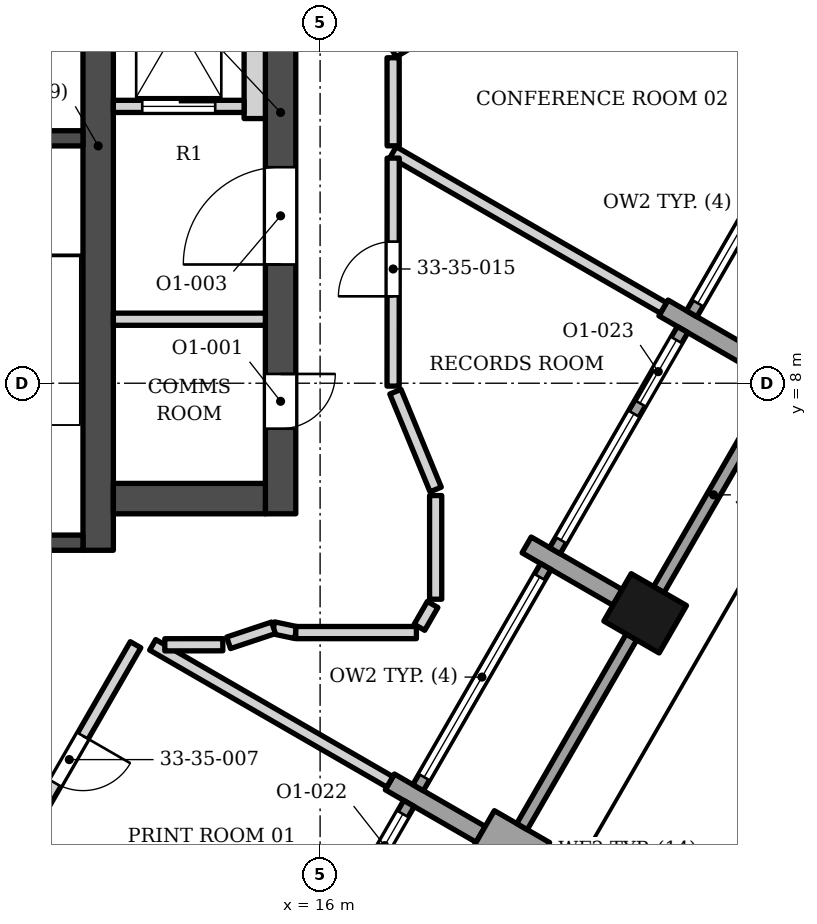
"""IFC4 building model, lengths in metres.
Left out: names, types, materials, properties, quantities, classifications, styles, units other than length and angle.
Written with IfcOpenShell. Run it as: python <this file> out.ifc"""

import sys

from ifc_helpers import new_model, si_unit, direction, frame, frame_2d, origin, origin_2d, place, context, subcontext, project, spatial, rectangle, extrude, element, fill, save


model = new_model("IFC4")
c1 = context("Model", 3, precision=1e-05, world=origin(), true_north=direction((0.0, 1.0)))
c2 = subcontext(c1, "Body", "Model", "MODEL_VIEW")
j1 = project(units=[si_unit("LENGTHUNIT", "METRE"), si_unit("PLANEANGLEUNIT", "RADIAN")], contexts=[c1])
p1 = place(None, origin())
s1 = spatial("IfcSite", under=j1, at=p1, CompositionType="ELEMENT")
p2 = place(p1, origin())
s2 = spatial("IfcBuilding", under=s1, at=p2, CompositionType="ELEMENT")
p3 = place(p2, frame((0.0, 0.0, 144.6)))
s3 = spatial("IfcBuildingStorey", under=s2, at=p3, CompositionType="ELEMENT", Elevation=144.6)
p4 = place(p3, frame((12.35, 5.253, 0.0), z_axis=(0.0, 0.0, 1.0), x_axis=(0.0, 1.0, 0.0)))
e1 = element("IfcWall", 1, at=p4, inside=s3, PredefinedType="SHEAR", context=c2, shape_type="SweptSolid", body=[
    extrude(rectangle(XDim=13.3, YDim=0.5, at=frame_2d((6.65, 0.0))), origin(), (0.0, 0.0, 1.0), 3.9),
])
for number, where, z_axis, x_axis in (
    (2, (8.35, 12.028, 0.0), (0.0, 0.0, 1.0), (1.0, 0.0, 0.0)),
    (3, (8.35, 5.378, 0.0), (0.0, 0.0, 1.0), (1.0, 0.0, 0.0)),
):
    element("IfcWall", number, at=place(p3, frame(where, z_axis=z_axis, x_axis=x_axis)), inside=s3, PredefinedType="SHEAR", context=c2, shape_type="SweptSolid", body=[
        extrude(rectangle(XDim=3.75, YDim=0.25, at=frame_2d((1.875, 0.0))), origin(), (0.0, 0.0, 1.0), 3.9),
    ])
p5 = place(p3, frame((12.6, 6.103, 0.0), z_axis=(0.0, 0.0, 1.0), x_axis=(1.0, 0.0, 0.0)))
e4 = element("IfcWall", 4, at=p5, inside=s3, PredefinedType="SHEAR", context=c2, shape_type="SweptSolid", body=[
    extrude(rectangle(XDim=2.5, YDim=0.5, at=frame_2d((1.25, 0.0))), origin(), (0.0, 0.0, 1.0), 3.9),
])
p6 = place(p3, frame((15.35, 5.853, 0.0), z_axis=(0.0, 0.0, 1.0), x_axis=(0.0, 1.0, 0.0)))
e5 = element("IfcWall", 5, at=p6, inside=s3, PredefinedType="SHEAR", context=c2, shape_type="SweptSolid", body=[
    extrude(rectangle(XDim=13.2, YDim=0.5, at=frame_2d((6.6, 0.0))), origin(), (0.0, 0.0, 1.0), 3.9),
])
p7 = place(p6, frame((4.1, 0.0, 0.0)))
e6 = element("IfcOpeningElement", 6, at=p7, cuts=e5, PredefinedType="OPENING", context=c2, shape_type="SweptSolid", body=[
    extrude(rectangle(XDim=1.6, YDim=2.1, at=frame_2d((0.8, 1.05))), frame((0.0, 0.26, 0.0), z_axis=(0.0, -1.0, 0.0), x_axis=(1.0, 0.0, 0.0)), (0.0, 0.0, 1.0), 0.52),
])
p8 = place(p6, frame((1.4, 0.0, 0.0)))
e7 = element("IfcOpeningElement", 7, at=p8, cuts=e5, PredefinedType="OPENING", context=c2, shape_type="SweptSolid", body=[
    extrude(rectangle(XDim=0.9, YDim=2.1, at=frame_2d((0.45, 1.05))), frame((0.0, 0.26, 0.0), z_axis=(0.0, -1.0, 0.0), x_axis=(1.0, 0.0, 0.0)), (0.0, 0.0, 1.0), 0.52),
])
p9 = place(p6, frame((10.15, 0.0, 0.0)))
e8 = element("IfcOpeningElement", 8, at=p9, cuts=e5, PredefinedType="OPENING", context=c2, shape_type="SweptSolid", body=[
    extrude(rectangle(XDim=0.9, YDim=2.1, at=frame_2d((0.45, 1.05))), frame((0.0, 0.26, 0.0), z_axis=(0.0, -1.0, 0.0), x_axis=(1.0, 0.0, 0.0)), (0.0, 0.0, 1.0), 0.52),
])
p10 = place(p3, frame((21.346, 4.216, 0.0), z_axis=(0.0, 0.0, 1.0), x_axis=(0.499999984885, 0.866025412511, 0.0)))
e9 = element("IfcColumn", 9, at=p10, inside=s3, PredefinedType="COLUMN", context=c2, shape_type="SweptSolid", body=[
    extrude(rectangle(XDim=0.9, YDim=1.05, at=origin_2d()), origin(), (0.0, 0.0, 1.0), 3.9),
])
p11 = place(p3, frame((19.55, 0.056, 0.0), z_axis=(0.0, 0.0, 1.0), x_axis=(-0.865988129768, 0.500064554934, 0.0)))
e10 = element("IfcWall", 10, at=p11, inside=s3, PredefinedType="SOLIDWALL", context=c2, shape_type="SweptSolid", body=[
    extrude(rectangle(XDim=1.05, YDim=0.9, at=frame_2d((0.525, 0.0))), origin(), (0.0, 0.0, 1.0), 3.0),
])
p12 = place(p3, frame((18.641, 0.581, 0.0), z_axis=(0.0, 0.0, 1.0), x_axis=(-0.866013532718, 0.500020560727, 0.0)))
e11 = element("IfcWall", 11, at=p12, inside=s3, PredefinedType="SOLIDWALL", context=c2, shape_type="SweptSolid", body=[
    extrude(rectangle(XDim=1.725, YDim=0.3, at=frame_2d((0.863, 0.0))), origin(), (0.0, 0.0, 1.0), 3.0),
])
p13 = place(p3, frame((19.397, 5.341, 0.0), z_axis=(0.0, 0.0, 1.0), x_axis=(0.866013532718, -0.500020560727, 0.0)))
e12 = element("IfcWall", 12, at=p13, inside=s3, PredefinedType="SOLIDWALL", context=c2, shape_type="SweptSolid", body=[
    extrude(rectangle(XDim=1.725, YDim=0.3, at=frame_2d((0.863, 0.0))), origin(), (0.0, 0.0, 1.0), 2.95),
])
p14 = place(p3, frame((23.141, 8.375, 0.0), z_axis=(0.0, 0.0, 1.0), x_axis=(-0.866013532718, 0.500020560727, 0.0)))
e13 = element("IfcWall", 13, at=p14, inside=s3, PredefinedType="SOLIDWALL", context=c2, shape_type="SweptSolid", body=[
    extrude(rectangle(XDim=1.725, YDim=0.3, at=frame_2d((0.863, 0.0))), origin(), (0.0, 0.0, 1.0), 3.0),
])
p15 = place(p3, frame((15.362, -2.549, 0.0), z_axis=(0.0, 0.0, 1.0), x_axis=(0.500002543286, 0.866023935413, 0.0)))
e14 = element("IfcWall", 14, at=p15, inside=s3, PredefinedType="ELEMENTEDWALL", context=c2, shape_type="SweptSolid", body=[
    extrude(rectangle(XDim=4.2, YDim=0.2, at=frame_2d((2.1, 0.0))), origin(), (0.0, 0.0, 1.0), 3.0),
])
p16 = place(p15, frame((0.2, 0.0, 0.45)))
e15 = element("IfcOpeningElement", 15, at=p16, cuts=e14, PredefinedType="OPENING", context=c2, shape_type="SweptSolid", body=[
    extrude(rectangle(XDim=2.4, YDim=2.25, at=frame_2d((1.2, 1.125))), frame((0.0, 0.11, 0.0), z_axis=(0.0, -1.0, 0.0), x_axis=(1.0, 0.0, 0.0)), (0.0, 0.0, 1.0), 0.22),
])
p17 = place(p15, frame((2.8, 0.0, 0.0)))
e16 = element("IfcOpeningElement", 16, at=p17, cuts=e14, PredefinedType="OPENING", context=c2, shape_type="SweptSolid", body=[
    extrude(rectangle(XDim=1.2, YDim=2.7, at=frame_2d((0.6, 1.35))), frame((0.0, 0.11, 0.0), z_axis=(0.0, -1.0, 0.0), x_axis=(1.0, 0.0, 0.0)), (0.0, 0.0, 1.0), 0.22),
])
p18 = place(p3, frame((19.321, 0.708, 0.0), z_axis=(0.0, 0.0, 1.0), x_axis=(0.500012057535, 0.866018442252, 0.0)))
e17 = element("IfcWall", 17, at=p18, inside=s3, PredefinedType="SOLIDWALL", context=c2, shape_type="SweptSolid", body=[
    extrude(rectangle(XDim=3.6, YDim=0.2, at=frame_2d((1.8, 0.0))), origin(), (0.0, 0.0, 1.0), 3.0),
])
p19 = place(p3, frame((17.612, 1.349, 0.0), z_axis=(0.0, 0.0, 1.0), x_axis=(0.500027713859, 0.866009402589, 0.0)))
e18 = element("IfcWall", 18, at=p19, inside=s3, PredefinedType="ELEMENTEDWALL", context=c2, shape_type="SweptSolid", body=[
    extrude(rectangle(XDim=4.2, YDim=0.2, at=frame_2d((2.1, 0.0))), origin(), (0.0, 0.0, 1.0), 2.95),
])
p20 = place(p19, frame((0.2, 0.0, 0.45)))
e19 = element("IfcOpeningElement", 19, at=p20, cuts=e18, PredefinedType="OPENING", context=c2, shape_type="SweptSolid", body=[
    extrude(rectangle(XDim=3.8, YDim=2.25, at=frame_2d((1.9, 1.125))), frame((0.0, 0.11, 0.0), z_axis=(0.0, -1.0, 0.0), x_axis=(1.0, 0.0, 0.0)), (0.0, 0.0, 1.0), 0.22),
])
p21 = place(p3, frame((21.571, 4.605, 0.0), z_axis=(0.0, 0.0, 1.0), x_axis=(0.500012057535, 0.866018442252, 0.0)))
e20 = element("IfcWall", 20, at=p21, inside=s3, PredefinedType="SOLIDWALL", context=c2, shape_type="SweptSolid", body=[
    extrude(rectangle(XDim=3.6, YDim=0.2, at=frame_2d((1.8, 0.0))), origin(), (0.0, 0.0, 1.0), 3.0),
])
p22 = place(p3, frame((19.862, 5.246, 0.0), z_axis=(0.0, 0.0, 1.0), x_axis=(0.500027713859, 0.866009402589, 0.0)))
e21 = element("IfcWall", 21, at=p22, inside=s3, PredefinedType="ELEMENTEDWALL", context=c2, shape_type="SweptSolid", body=[
    extrude(rectangle(XDim=4.2, YDim=0.2, at=frame_2d((2.1, 0.0))), origin(), (0.0, 0.0, 1.0), 3.0),
])
p23 = place(p22, frame((0.2, 0.0, 0.45)))
e22 = element("IfcOpeningElement", 22, at=p23, cuts=e21, PredefinedType="OPENING", context=c2, shape_type="SweptSolid", body=[
    extrude(rectangle(XDim=2.4, YDim=2.25, at=frame_2d((1.2, 1.125))), frame((0.0, 0.11, 0.0), z_axis=(0.0, -1.0, 0.0), x_axis=(1.0, 0.0, 0.0)), (0.0, 0.0, 1.0), 0.22),
])
p24 = place(p22, frame((2.8, 0.0, 0.0)))
e23 = element("IfcOpeningElement", 23, at=p24, cuts=e21, PredefinedType="OPENING", context=c2, shape_type="SweptSolid", body=[
    extrude(rectangle(XDim=1.2, YDim=2.7, at=frame_2d((0.6, 1.35))), frame((0.0, 0.11, 0.0), z_axis=(0.0, -1.0, 0.0), x_axis=(1.0, 0.0, 0.0)), (0.0, 0.0, 1.0), 0.22),
])
p25 = place(p3, frame((22.112, 9.143, 0.0), z_axis=(0.0, 0.0, 1.0), x_axis=(0.500002543286, 0.866023935413, 0.0)))
e24 = element("IfcWall", 24, at=p25, inside=s3, PredefinedType="ELEMENTEDWALL", context=c2, shape_type="SweptSolid", body=[
    extrude(rectangle(XDim=4.2, YDim=0.2, at=frame_2d((2.1, 0.0))), origin(), (0.0, 0.0, 1.0), 3.0),
])
p26 = place(p25, frame((0.2, 0.0, 0.45)))
e25 = element("IfcOpeningElement", 25, at=p26, cuts=e24, PredefinedType="OPENING", context=c2, shape_type="SweptSolid", body=[
    extrude(rectangle(XDim=3.8, YDim=2.25, at=frame_2d((1.9, 1.125))), frame((0.0, 0.11, 0.0), z_axis=(0.0, -1.0, 0.0), x_axis=(1.0, 0.0, 0.0)), (0.0, 0.0, 1.0), 0.22),
])
p27 = place(p3, frame((12.6, 9.052, 0.0), z_axis=(0.0, 0.0, 1.0), x_axis=(1.0, 0.0, 0.0)))
e26 = element("IfcWall", 26, at=p27, inside=s3, PredefinedType="PARTITIONING", context=c2, shape_type="SweptSolid", body=[
    extrude(rectangle(XDim=2.5, YDim=0.2, at=frame_2d((1.25, 0.0))), origin(), (0.0, 0.0, 1.0), 3.73),
])
p28 = place(p3, frame((14.925, 12.353, 0.0), z_axis=(0.0, 0.0, 1.0), x_axis=(0.0, 1.0, 0.0)))
e27 = element("IfcWall", 27, at=p28, inside=s3, PredefinedType="SOLIDWALL", context=c2, shape_type="SweptSolid", body=[
    extrude(rectangle(XDim=3.6, YDim=0.35, at=frame_2d((1.8, 0.0))), origin(), (0.0, 0.0, 1.0), 3.73),
])
p29 = place(p3, frame((12.6, 12.552, 0.0), z_axis=(0.0, 0.0, 1.0), x_axis=(1.0, 0.0, 0.0)))
e28 = element("IfcWall", 28, at=p29, inside=s3, PredefinedType="SOLIDWALL", context=c2, shape_type="SweptSolid", body=[
    extrude(rectangle(XDim=2.15, YDim=0.2, at=frame_2d((1.075, 0.0))), origin(), (0.0, 0.0, 1.0), 3.73),
])
p30 = place(p29, frame((0.475, 0.0, 0.0)))
e29 = element("IfcOpeningElement", 29, at=p30, cuts=e28, PredefinedType="OPENING", context=c2, shape_type="SweptSolid", body=[
    extrude(rectangle(XDim=1.2, YDim=2.1, at=frame_2d((0.6, 1.05))), frame((0.0, 0.11, 0.0), z_axis=(0.0, -1.0, 0.0), x_axis=(1.0, 0.0, 0.0)), (0.0, 0.0, 1.0), 0.22),
])
p31 = place(p3, frame((10.786, -0.078, 0.0), z_axis=(0.0, 0.0, 1.0), x_axis=(0.499631976044, 0.866237778277, 0.0)))
e30 = element("IfcWall", 30, at=p31, inside=s3, PredefinedType="PARTITIONING", context=c2, shape_type="SweptSolid", body=[
    extrude(rectangle(XDim=4.361, YDim=0.2, at=frame_2d((2.18, 0.0))), origin(), (0.0, 0.0, 1.0), 3.73),
])
p32 = place(p31, frame((1.729, 0.0, 0.0)))
e31 = element("IfcOpeningElement", 31, at=p32, cuts=e30, PredefinedType="OPENING", context=c2, shape_type="SweptSolid", body=[
    extrude(rectangle(XDim=0.9, YDim=2.1, at=frame_2d((0.45, 1.05))), frame((0.0, 0.11, 0.0), z_axis=(0.0, -1.0, 0.0), x_axis=(1.0, 0.0, 0.0)), (0.0, 0.0, 1.0), 0.22),
])
p33 = place(p3, frame((13.247, 3.698, 0.0), z_axis=(0.0, 0.0, 1.0), x_axis=(0.865845249199, -0.500311907154, 0.0)))
e32 = element("IfcWall", 32, at=p33, inside=s3, PredefinedType="PARTITIONING", context=c2, shape_type="SweptSolid", body=[
    extrude(rectangle(XDim=4.505, YDim=0.2, at=frame_2d((2.252, 0.0))), origin(), (0.0, 0.0, 1.0), 3.052),
])
p34 = place(p3, frame((13.446, 3.698, 0.0), z_axis=(0.0, 0.0, 1.0), x_axis=(0.999999181535, 0.00127942577, 0.0)))
e33 = element("IfcWall", 33, at=p34, inside=s3, PredefinedType="PARTITIONING", context=c2, shape_type="SweptSolid", body=[
    extrude(rectangle(XDim=0.954, YDim=0.2, at=frame_2d((0.477, 0.0))), origin(), (0.0, 0.0, 1.0), 3.73),
])
p35 = place(p3, frame((15.234, 3.977, 0.0), z_axis=(0.0, 0.0, 1.0), x_axis=(0.978153882022, -0.207882137485, 0.0)))
e34 = element("IfcWall", 34, at=p35, inside=s3, PredefinedType="PARTITIONING", context=c2, shape_type="SweptSolid", body=[
    extrude(rectangle(XDim=0.375, YDim=0.2, at=frame_2d((0.188, 0.0))), origin(), (0.0, 0.0, 1.0), 3.73),
])
p36 = place(p3, frame((15.6, 3.899, 0.0), z_axis=(0.0, 0.0, 1.0), x_axis=(1.0, 0.0, 0.0)))
e35 = element("IfcWall", 35, at=p36, inside=s3, PredefinedType="PARTITIONING", context=c2, shape_type="SweptSolid", body=[
    extrude(rectangle(XDim=1.984, YDim=0.2, at=frame_2d((0.992, 0.0))), origin(), (0.0, 0.0, 1.0), 3.73),
])
p37 = place(p3, frame((14.495, 3.731, 0.0), z_axis=(0.0, 0.0, 1.0), x_axis=(0.948745985677, 0.316039640966, 0.0)))
e36 = element("IfcWall", 36, at=p37, inside=s3, PredefinedType="PARTITIONING", context=c2, shape_type="SweptSolid", body=[
    extrude(rectangle(XDim=0.779, YDim=0.2, at=frame_2d((0.389, 0.0))), origin(), (0.0, 0.0, 1.0), 3.73),
])
p38 = place(p3, frame((17.634, 3.986, 0.0), z_axis=(0.0, 0.0, 1.0), x_axis=(0.500258826225, 0.865875918815, 0.0)))
e37 = element("IfcWall", 37, at=p38, inside=s3, PredefinedType="PARTITIONING", context=c2, shape_type="SweptSolid", body=[
    extrude(rectangle(XDim=0.433, YDim=0.2, at=frame_2d((0.217, 0.0))), origin(), (0.0, 0.0, 1.0), 3.332),
])
p39 = place(p3, frame((17.9, 4.448, 0.0), z_axis=(0.0, 0.0, 1.0), x_axis=(0.0, 1.0, 0.0)))
e38 = element("IfcWall", 38, at=p39, inside=s3, PredefinedType="PARTITIONING", context=c2, shape_type="SweptSolid", body=[
    extrude(rectangle(XDim=1.705, YDim=0.2, at=frame_2d((0.852, 0.0))), origin(), (0.0, 0.0, 1.0), 2.95),
])
p40 = place(p3, frame((17.239, 7.86, 0.0), z_axis=(0.0, 0.0, 1.0), x_axis=(0.380742741509, -0.924681007044, 0.0)))
e39 = element("IfcWall", 39, at=p40, inside=s3, PredefinedType="PARTITIONING", context=c2, shape_type="SweptSolid", body=[
    extrude(rectangle(XDim=1.738, YDim=0.2, at=frame_2d((0.869, 0.0))), origin(), (0.0, 0.0, 1.0), 3.73),
])
p41 = place(p3, frame((17.202, 11.802, 0.0), z_axis=(0.0, 0.0, 1.0), x_axis=(0.866206970465, -0.499685385335, 0.0)))
e40 = element("IfcWall", 40, at=p41, inside=s3, PredefinedType="PARTITIONING", context=c2, shape_type="SweptSolid", body=[
    extrude(rectangle(XDim=5.132, YDim=0.2, at=frame_2d((2.566, 0.0))), origin(), (0.0, 0.0, 1.0), 3.73),
])
p42 = place(p3, frame((17.2, 7.953, 0.0), z_axis=(0.0, 0.0, 1.0), x_axis=(0.000390701279, 0.999999923676, 0.0)))
e41 = element("IfcWall", 41, at=p42, inside=s3, PredefinedType="PARTITIONING", context=c2, shape_type="SweptSolid", body=[
    extrude(rectangle(XDim=3.749, YDim=0.2, at=frame_2d((1.875, 0.0))), origin(), (0.0, 0.0, 1.0), 3.73),
])
p43 = place(p42, frame((1.476, 0.0, 0.0)))
e42 = element("IfcOpeningElement", 42, at=p43, cuts=e41, PredefinedType="OPENING", context=c2, shape_type="SweptSolid", body=[
    extrude(rectangle(XDim=0.9, YDim=2.1, at=frame_2d((0.45, 1.05))), frame((0.0, 0.11, 0.0), z_axis=(0.0, -1.0, 0.0), x_axis=(1.0, 0.0, 0.0)), (0.0, 0.0, 1.0), 0.22),
])
p44 = place(p3, frame((17.201, 13.352, 0.0), z_axis=(0.0, 0.0, 1.0), x_axis=(0.000843027858, -0.999999644652, 0.0)))
e43 = element("IfcWall", 43, at=p44, inside=s3, PredefinedType="PARTITIONING", context=c2, shape_type="SweptSolid", body=[
    extrude(rectangle(XDim=1.448, YDim=0.2, at=frame_2d((0.724, 0.0))), origin(), (0.0, 0.0, 1.0), 3.73),
])
p45 = place(p3, frame((17.2, 13.452, 0.0), z_axis=(0.0, 0.0, 1.0), x_axis=(0.858479307904, 0.512848201616, 0.0)))
e44 = element("IfcWall", 44, at=p45, inside=s3, PredefinedType="PARTITIONING", context=c2, shape_type="SweptSolid", body=[
    extrude(rectangle(XDim=3.314, YDim=0.2, at=frame_2d((1.657, 0.0))), origin(), (0.0, 0.0, 1.0), 3.73),
])
p46 = place(p45, frame((1.157, 0.0, 0.0)))
e45 = element("IfcOpeningElement", 45, at=p46, cuts=e44, PredefinedType="OPENING", context=c2, shape_type="SweptSolid", body=[
    extrude(rectangle(XDim=1.0, YDim=2.1, at=frame_2d((0.5, 1.05))), frame((0.0, 0.11, 0.0), z_axis=(0.0, -1.0, 0.0), x_axis=(1.0, 0.0, 0.0)), (0.0, 0.0, 1.0), 0.22),
])
p47 = place(p17, origin())
e46 = element("IfcDoor", 46, at=p47, inside=s3, OperationType="SINGLE_SWING_LEFT", PredefinedType="DOOR", context=c2, shape_type="SweptSolid", body=[
    extrude(rectangle(XDim=1.2, YDim=2.7, at=frame_2d((0.6, 1.35))), frame((0.0, 0.025, 0.0), z_axis=(0.0, -1.0, 0.0), x_axis=(1.0, 0.0, 0.0)), (0.0, 0.0, 1.0), 0.05),
])
fill(e16, e46)
p48 = place(p20, origin())
e47 = element("IfcWindow", 47, at=p48, inside=s3, PartitioningType="SINGLE_PANEL", PredefinedType="WINDOW", context=c2, shape_type="SweptSolid", body=[
    extrude(rectangle(XDim=3.8, YDim=2.25, at=frame_2d((1.9, 1.125))), frame((0.0, 0.03, 0.0), z_axis=(0.0, -1.0, 0.0), x_axis=(1.0, 0.0, 0.0)), (0.0, 0.0, 1.0), 0.06),
])
fill(e19, e47)
p49 = place(p23, origin())
e48 = element("IfcWindow", 48, at=p49, inside=s3, PartitioningType="SINGLE_PANEL", PredefinedType="WINDOW", context=c2, shape_type="SweptSolid", body=[
    extrude(rectangle(XDim=2.4, YDim=2.25, at=frame_2d((1.2, 1.125))), frame((0.0, 0.03, 0.0), z_axis=(0.0, -1.0, 0.0), x_axis=(1.0, 0.0, 0.0)), (0.0, 0.0, 1.0), 0.06),
])
fill(e22, e48)
p50 = place(p24, origin())
e49 = element("IfcDoor", 49, at=p50, inside=s3, OperationType="SINGLE_SWING_LEFT", PredefinedType="DOOR", context=c2, shape_type="SweptSolid", body=[
    extrude(rectangle(XDim=1.2, YDim=2.7, at=frame_2d((0.6, 1.35))), frame((0.0, 0.025, 0.0), z_axis=(0.0, -1.0, 0.0), x_axis=(1.0, 0.0, 0.0)), (0.0, 0.0, 1.0), 0.05),
])
fill(e23, e49)
p51 = place(p26, origin())
e50 = element("IfcWindow", 50, at=p51, inside=s3, PartitioningType="SINGLE_PANEL", PredefinedType="WINDOW", context=c2, shape_type="SweptSolid", body=[
    extrude(rectangle(XDim=3.8, YDim=2.25, at=frame_2d((1.9, 1.125))), frame((0.0, 0.03, 0.0), z_axis=(0.0, -1.0, 0.0), x_axis=(1.0, 0.0, 0.0)), (0.0, 0.0, 1.0), 0.06),
])
fill(e25, e50)
p52 = place(p30, origin())
e51 = element("IfcDoor", 51, at=p52, inside=s3, OperationType="DOUBLE_DOOR_SLIDING", PredefinedType="DOOR", context=c2, shape_type="SweptSolid", body=[
    extrude(rectangle(XDim=1.2, YDim=2.1, at=frame_2d((0.6, 1.05))), frame((0.0, 0.025, 0.0), z_axis=(0.0, -1.0, 0.0), x_axis=(1.0, 0.0, 0.0)), (0.0, 0.0, 1.0), 0.05),
])
fill(e29, e51)
p53 = place(p7, origin())
e52 = element("IfcDoor", 52, at=p53, inside=s3, OperationType="DOUBLE_DOOR_SINGLE_SWING", PredefinedType="DOOR", context=c2, shape_type="SweptSolid", body=[
    extrude(rectangle(XDim=1.6, YDim=2.1, at=frame_2d((0.8, 1.05))), frame((0.0, 0.025, 0.0), z_axis=(0.0, -1.0, 0.0), x_axis=(1.0, 0.0, 0.0)), (0.0, 0.0, 1.0), 0.05),
])
fill(e6, e52)
p54 = place(p8, origin())
e53 = element("IfcDoor", 53, at=p54, inside=s3, OperationType="SINGLE_SWING_RIGHT", PredefinedType="DOOR", context=c2, shape_type="SweptSolid", body=[
    extrude(rectangle(XDim=0.9, YDim=2.1, at=frame_2d((0.45, 1.05))), frame((0.0, 0.025, 0.0), z_axis=(0.0, -1.0, 0.0), x_axis=(1.0, 0.0, 0.0)), (0.0, 0.0, 1.0), 0.05),
])
fill(e7, e53)
p55 = place(p32, origin())
e54 = element("IfcDoor", 54, at=p55, inside=s3, OperationType="SINGLE_SWING_RIGHT", PredefinedType="DOOR", context=c2, shape_type="SweptSolid", body=[
    extrude(rectangle(XDim=0.9, YDim=2.1, at=frame_2d((0.45, 1.05))), frame((0.0, 0.025, 0.0), z_axis=(0.0, -1.0, 0.0), x_axis=(1.0, 0.0, 0.0)), (0.0, 0.0, 1.0), 0.05),
])
fill(e31, e54)
p56 = place(p43, origin())
e55 = element("IfcDoor", 55, at=p56, inside=s3, OperationType="SINGLE_SWING_LEFT", PredefinedType="DOOR", context=c2, shape_type="SweptSolid", body=[
    extrude(rectangle(XDim=0.9, YDim=2.1, at=frame_2d((0.45, 1.05))), frame((0.0, 0.025, 0.0), z_axis=(0.0, -1.0, 0.0), x_axis=(1.0, 0.0, 0.0)), (0.0, 0.0, 1.0), 0.05),
])
fill(e42, e55)
save(model, sys.argv[1])
